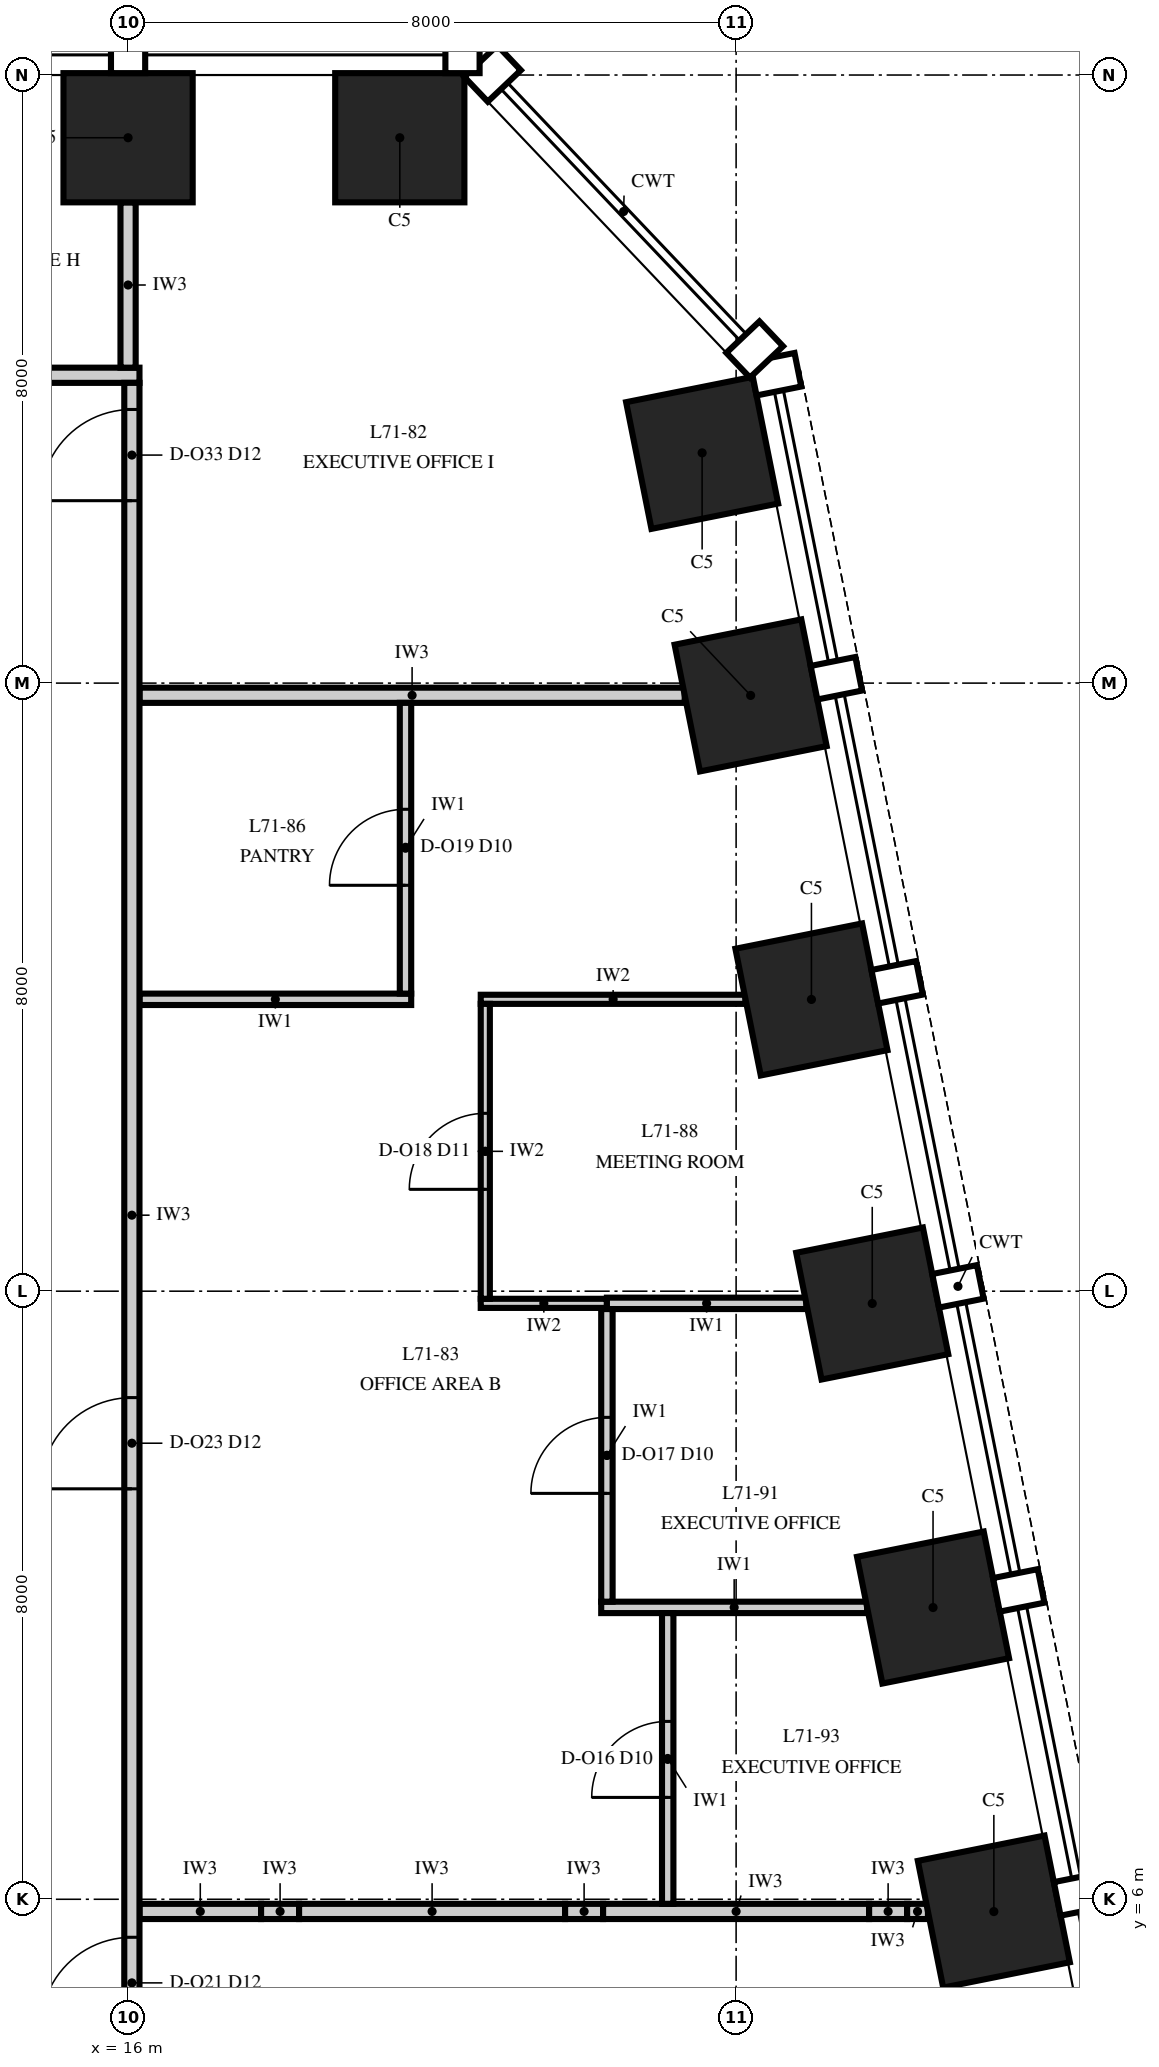
"""IFC4 building model, lengths in metres.
Left out: names, types, materials, properties, quantities, classifications, styles, units other than length and angle.
Written with IfcOpenShell. Run it as: python <this file> out.ifc"""

import sys

from ifc_helpers import new_model, si_unit, direction, frame, frame_2d, origin, origin_2d, place, context, subcontext, project, spatial, rectangle, extrude, element, fill, save


model = new_model("IFC4")
c1 = context("Model", 3, precision=1e-05, world=origin(), true_north=direction((0.0, 1.0)))
c2 = subcontext(c1, "Body", "Model", "MODEL_VIEW")
j1 = project(units=[si_unit("LENGTHUNIT", "METRE"), si_unit("PLANEANGLEUNIT", "RADIAN")], contexts=[c1])
p1 = place(None, origin())
s1 = spatial("IfcSite", under=j1, at=p1, CompositionType="ELEMENT")
p2 = place(p1, origin())
s2 = spatial("IfcBuilding", under=s1, at=p2, CompositionType="ELEMENT")
p3 = place(p2, frame((0.0, 0.0, 304.0)))
s3 = spatial("IfcBuildingStorey", under=s2, at=p3, CompositionType="ELEMENT", Elevation=304.0)
for number, where, z_axis, x_axis in (
    (1, (27.391, 5.838, 0.0), (0.0, 0.0, 1.0), (-0.196, 0.981, 0.0)),
    (2, (26.591, 9.838, 0.0), (0.0, 0.0, 1.0), (-0.196, 0.981, 0.0)),
    (3, (25.791, 13.838, 0.0), (0.0, 0.0, 1.0), (-0.196, 0.981, 0.0)),
    (4, (24.991, 17.838, 0.0), (0.0, 0.0, 1.0), (-0.196, 0.981, 0.0)),
    (5, (24.191, 21.838, 0.0), (0.0, 0.0, 1.0), (-0.196, 0.981, 0.0)),
    (6, (23.553, 25.029, 0.0), (0.0, 0.0, 1.0), (-0.196, 0.981, 0.0)),
    (7, (19.575, 29.175, 0.0), (0.0, 0.0, 1.0), (-1.0, 0.0, 0.0)),
    (8, (16.0, 29.175, 0.0), (0.0, 0.0, 1.0), (-1.0, 0.0, 0.0)),
):
    element("IfcColumn", number, at=place(p3, frame(where, z_axis=z_axis, x_axis=x_axis)), inside=s3, PredefinedType="COLUMN", context=c2, shape_type="SweptSolid", body=[
        extrude(rectangle(XDim=1.7, YDim=1.7, at=origin_2d()), origin(), (0.0, 0.0, 1.0), 4.0),
    ])
p4 = place(p3, frame((16.15, 5.84, 0.0), z_axis=(0.0, 0.0, 1.0), x_axis=(1.0, 0.0, 0.0)))
e9 = element("IfcWall", 9, at=p4, inside=s3, PredefinedType="PARTITIONING", context=c2, shape_type="SweptSolid", body=[
    extrude(rectangle(XDim=1.6, YDim=0.2, at=frame_2d((0.8, 0.0))), origin(), (0.0, 0.0, 1.0), 2.842),
])
p5 = place(p3, frame((17.75, 5.84, 0.0), z_axis=(0.0, 0.0, 1.0), x_axis=(1.0, 0.0, 0.0)))
e10 = element("IfcWall", 10, at=p5, inside=s3, PredefinedType="PARTITIONING", context=c2, shape_type="SweptSolid", body=[
    extrude(rectangle(XDim=0.5, YDim=0.2, at=frame_2d((0.25, 0.0))), origin(), (0.0, 0.0, 1.0), 2.15),
])
p6 = place(p3, frame((18.25, 5.84, 0.0), z_axis=(0.0, 0.0, 1.0), x_axis=(1.0, 0.0, 0.0)))
e11 = element("IfcWall", 11, at=p6, inside=s3, PredefinedType="PARTITIONING", context=c2, shape_type="SweptSolid", body=[
    extrude(rectangle(XDim=3.5, YDim=0.2, at=frame_2d((1.75, 0.0))), origin(), (0.0, 0.0, 1.0), 2.842),
])
p7 = place(p3, frame((21.75, 5.84, 0.0), z_axis=(0.0, 0.0, 1.0), x_axis=(1.0, 0.0, 0.0)))
e12 = element("IfcWall", 12, at=p7, inside=s3, PredefinedType="PARTITIONING", context=c2, shape_type="SweptSolid", body=[
    extrude(rectangle(XDim=0.5, YDim=0.2, at=frame_2d((0.25, 0.0))), origin(), (0.0, 0.0, 1.0), 2.15),
])
p8 = place(p3, frame((22.25, 5.84, 0.0), z_axis=(0.0, 0.0, 1.0), x_axis=(1.0, 0.0, 0.0)))
e13 = element("IfcWall", 13, at=p8, inside=s3, PredefinedType="PARTITIONING", context=c2, shape_type="SweptSolid", body=[
    extrude(rectangle(XDim=3.5, YDim=0.2, at=frame_2d((1.75, 0.0))), origin(), (0.0, 0.0, 1.0), 2.842),
])
p9 = place(p3, frame((25.75, 5.84, 0.0), z_axis=(0.0, 0.0, 1.0), x_axis=(1.0, 0.0, 0.0)))
e14 = element("IfcWall", 14, at=p9, inside=s3, PredefinedType="PARTITIONING", context=c2, shape_type="SweptSolid", body=[
    extrude(rectangle(XDim=0.5, YDim=0.2, at=frame_2d((0.25, 0.0))), origin(), (0.0, 0.0, 1.0), 2.15),
])
p10 = place(p3, frame((26.25, 5.84, 0.0), z_axis=(0.0, 0.0, 1.0), x_axis=(1.0, 0.0, 0.0)))
e15 = element("IfcWall", 15, at=p10, inside=s3, PredefinedType="PARTITIONING", context=c2, shape_type="SweptSolid", body=[
    extrude(rectangle(XDim=0.274, YDim=0.2, at=frame_2d((0.137, 0.0))), origin(), (0.0, 0.0, 1.0), 2.842),
])
p11 = place(p3, frame((22.225, 9.84, 0.0), z_axis=(0.0, 0.0, 1.0), x_axis=(1.0, 0.0, 0.0)))
e16 = element("IfcWall", 16, at=p11, inside=s3, PredefinedType="PARTITIONING", context=c2, shape_type="SweptSolid", body=[
    extrude(rectangle(XDim=3.499, YDim=0.15, at=frame_2d((1.75, 0.0))), origin(), (0.0, 0.0, 1.0), 3.23),
])
p12 = place(p3, frame((20.64, 13.84, 0.0), z_axis=(0.0, 0.0, 1.0), x_axis=(1.0, 0.0, 0.0)))
e17 = element("IfcWall", 17, at=p12, inside=s3, PredefinedType="PARTITIONING", context=c2, shape_type="SweptSolid", body=[
    extrude(rectangle(XDim=1.66, YDim=0.12, at=frame_2d((0.83, 0.0))), origin(), (0.0, 0.0, 1.0), 3.85),
])
p13 = place(p3, frame((22.3, 13.84, 0.0), z_axis=(0.0, 0.0, 1.0), x_axis=(1.0, 0.0, 0.0)))
e18 = element("IfcWall", 18, at=p13, inside=s3, PredefinedType="PARTITIONING", context=c2, shape_type="SweptSolid", body=[
    extrude(rectangle(XDim=2.624, YDim=0.15, at=frame_2d((1.312, 0.0))), origin(), (0.0, 0.0, 1.0), 3.23),
])
p14 = place(p3, frame((16.15, 17.84, 0.0), z_axis=(0.0, 0.0, 1.0), x_axis=(1.0, 0.0, 0.0)))
e19 = element("IfcWall", 19, at=p14, inside=s3, PredefinedType="PARTITIONING", context=c2, shape_type="SweptSolid", body=[
    extrude(rectangle(XDim=3.575, YDim=0.15, at=frame_2d((1.788, 0.0))), origin(), (0.0, 0.0, 1.0), 3.23),
])
p15 = place(p3, frame((20.64, 17.84, 0.0), z_axis=(0.0, 0.0, 1.0), x_axis=(1.0, 0.0, 0.0)))
e20 = element("IfcWall", 20, at=p15, inside=s3, PredefinedType="PARTITIONING", context=c2, shape_type="SweptSolid", body=[
    extrude(rectangle(XDim=3.484, YDim=0.12, at=frame_2d((1.742, 0.0))), origin(), (0.0, 0.0, 1.0), 3.23),
])
p16 = place(p3, frame((16.15, 21.84, 0.0), z_axis=(0.0, 0.0, 1.0), x_axis=(1.0, 0.0, 0.0)))
e21 = element("IfcWall", 21, at=p16, inside=s3, PredefinedType="PARTITIONING", context=c2, shape_type="SweptSolid", body=[
    extrude(rectangle(XDim=7.174, YDim=0.2, at=frame_2d((3.587, 0.0))), origin(), (0.0, 0.0, 1.0), 3.23),
])
p17 = place(p3, frame((-16.15, 26.05, 0.0), z_axis=(0.0, 0.0, 1.0), x_axis=(1.0, 0.0, 0.0)))
e22 = element("IfcWall", 22, at=p17, inside=s3, PredefinedType="PARTITIONING", context=c2, shape_type="SweptSolid", body=[
    extrude(rectangle(XDim=32.3, YDim=0.2, at=frame_2d((16.15, 0.0))), origin(), (0.0, 0.0, 1.0), 3.418),
])
p18 = place(p17, frame((1.55, 0.0, 0.0)))
e23 = element("IfcOpeningElement", 23, at=p18, cuts=e22, PredefinedType="OPENING", context=c2, shape_type="SweptSolid", body=[
    extrude(rectangle(XDim=1.2, YDim=2.4, at=frame_2d((0.6, 1.2))), frame((0.0, 0.115, 0.0), z_axis=(0.0, -1.0, 0.0), x_axis=(1.0, 0.0, 0.0)), (0.0, 0.0, 1.0), 0.23),
])
p19 = place(p17, frame((5.55, 0.0, 0.0)))
e24 = element("IfcOpeningElement", 24, at=p19, cuts=e22, PredefinedType="OPENING", context=c2, shape_type="SweptSolid", body=[
    extrude(rectangle(XDim=1.2, YDim=2.4, at=frame_2d((0.6, 1.2))), frame((0.0, 0.115, 0.0), z_axis=(0.0, -1.0, 0.0), x_axis=(1.0, 0.0, 0.0)), (0.0, 0.0, 1.0), 0.23),
])
p20 = place(p17, frame((9.55, 0.0, 0.0)))
e25 = element("IfcOpeningElement", 25, at=p20, cuts=e22, PredefinedType="OPENING", context=c2, shape_type="SweptSolid", body=[
    extrude(rectangle(XDim=1.2, YDim=2.4, at=frame_2d((0.6, 1.2))), frame((0.0, 0.115, 0.0), z_axis=(0.0, -1.0, 0.0), x_axis=(1.0, 0.0, 0.0)), (0.0, 0.0, 1.0), 0.23),
])
p21 = place(p17, frame((13.55, 0.0, 0.0)))
e26 = element("IfcOpeningElement", 26, at=p21, cuts=e22, PredefinedType="OPENING", context=c2, shape_type="SweptSolid", body=[
    extrude(rectangle(XDim=1.2, YDim=2.4, at=frame_2d((0.6, 1.2))), frame((0.0, 0.115, 0.0), z_axis=(0.0, -1.0, 0.0), x_axis=(1.0, 0.0, 0.0)), (0.0, 0.0, 1.0), 0.23),
])
p22 = place(p17, frame((17.55, 0.0, 0.0)))
e27 = element("IfcOpeningElement", 27, at=p22, cuts=e22, PredefinedType="OPENING", context=c2, shape_type="SweptSolid", body=[
    extrude(rectangle(XDim=1.2, YDim=2.4, at=frame_2d((0.6, 1.2))), frame((0.0, 0.115, 0.0), z_axis=(0.0, -1.0, 0.0), x_axis=(1.0, 0.0, 0.0)), (0.0, 0.0, 1.0), 0.23),
])
p23 = place(p17, frame((21.55, 0.0, 0.0)))
e28 = element("IfcOpeningElement", 28, at=p23, cuts=e22, PredefinedType="OPENING", context=c2, shape_type="SweptSolid", body=[
    extrude(rectangle(XDim=1.2, YDim=2.4, at=frame_2d((0.6, 1.2))), frame((0.0, 0.115, 0.0), z_axis=(0.0, -1.0, 0.0), x_axis=(1.0, 0.0, 0.0)), (0.0, 0.0, 1.0), 0.23),
])
p24 = place(p17, frame((25.55, 0.0, 0.0)))
e29 = element("IfcOpeningElement", 29, at=p24, cuts=e22, PredefinedType="OPENING", context=c2, shape_type="SweptSolid", body=[
    extrude(rectangle(XDim=1.2, YDim=2.4, at=frame_2d((0.6, 1.2))), frame((0.0, 0.115, 0.0), z_axis=(0.0, -1.0, 0.0), x_axis=(1.0, 0.0, 0.0)), (0.0, 0.0, 1.0), 0.23),
])
p25 = place(p17, frame((29.55, 0.0, 0.0)))
e30 = element("IfcOpeningElement", 30, at=p25, cuts=e22, PredefinedType="OPENING", context=c2, shape_type="SweptSolid", body=[
    extrude(rectangle(XDim=1.2, YDim=2.4, at=frame_2d((0.6, 1.2))), frame((0.0, 0.115, 0.0), z_axis=(0.0, -1.0, 0.0), x_axis=(1.0, 0.0, 0.0)), (0.0, 0.0, 1.0), 0.23),
])
p26 = place(p3, frame((16.0, 26.15, 0.0), z_axis=(0.0, 0.0, 1.0), x_axis=(0.0, 1.0, 0.0)))
e31 = element("IfcWall", 31, at=p26, inside=s3, PredefinedType="PARTITIONING", context=c2, shape_type="SweptSolid", body=[
    extrude(rectangle(XDim=2.175, YDim=0.2, at=frame_2d((1.087, 0.0))), origin(), (0.0, 0.0, 1.0), 3.418),
])
p27 = place(p3, frame((16.05, 4.05, 0.0), z_axis=(0.0, 0.0, 1.0), x_axis=(0.0, 1.0, 0.0)))
e32 = element("IfcWall", 32, at=p27, inside=s3, PredefinedType="PARTITIONING", context=c2, shape_type="SweptSolid", body=[
    extrude(rectangle(XDim=21.9, YDim=0.2, at=frame_2d((10.95, 0.0))), origin(), (0.0, 0.0, 1.0), 2.842),
])
p28 = place(p27, frame((0.25, 0.0, 0.0)))
e33 = element("IfcOpeningElement", 33, at=p28, cuts=e32, PredefinedType="OPENING", context=c2, shape_type="SweptSolid", body=[
    extrude(rectangle(XDim=1.2, YDim=2.4, at=frame_2d((0.6, 1.2))), frame((0.0, 0.115, 0.0), z_axis=(0.0, -1.0, 0.0), x_axis=(1.0, 0.0, 0.0)), (0.0, 0.0, 1.0), 0.23),
])
p29 = place(p27, frame((7.35, 0.0, 0.0)))
e34 = element("IfcOpeningElement", 34, at=p29, cuts=e32, PredefinedType="OPENING", context=c2, shape_type="SweptSolid", body=[
    extrude(rectangle(XDim=1.2, YDim=2.4, at=frame_2d((0.6, 1.2))), frame((0.0, 0.115, 0.0), z_axis=(0.0, -1.0, 0.0), x_axis=(1.0, 0.0, 0.0)), (0.0, 0.0, 1.0), 0.23),
])
p30 = place(p27, frame((20.35, 0.0, 0.0)))
e35 = element("IfcOpeningElement", 35, at=p30, cuts=e32, PredefinedType="OPENING", context=c2, shape_type="SweptSolid", body=[
    extrude(rectangle(XDim=1.2, YDim=2.4, at=frame_2d((0.6, 1.2))), frame((0.0, 0.115, 0.0), z_axis=(0.0, -1.0, 0.0), x_axis=(1.0, 0.0, 0.0)), (0.0, 0.0, 1.0), 0.23),
])
p31 = place(p3, frame((19.65, 17.915, 0.0), z_axis=(0.0, 0.0, 1.0), x_axis=(0.0, 1.0, 0.0)))
e36 = element("IfcWall", 36, at=p31, inside=s3, PredefinedType="PARTITIONING", context=c2, shape_type="SweptSolid", body=[
    extrude(rectangle(XDim=3.825, YDim=0.15, at=frame_2d((1.913, 0.0))), origin(), (0.0, 0.0, 1.0), 3.23),
])
p32 = place(p31, frame((1.425, 0.0, 0.0)))
e37 = element("IfcOpeningElement", 37, at=p32, cuts=e36, PredefinedType="OPENING", context=c2, shape_type="SweptSolid", body=[
    extrude(rectangle(XDim=1.0, YDim=2.3, at=frame_2d((0.5, 1.15))), frame((0.0, 0.09, 0.0), z_axis=(0.0, -1.0, 0.0), x_axis=(1.0, 0.0, 0.0)), (0.0, 0.0, 1.0), 0.18),
])
p33 = place(p3, frame((20.7, 13.9, 0.0), z_axis=(0.0, 0.0, 1.0), x_axis=(0.0, 1.0, 0.0)))
e38 = element("IfcWall", 38, at=p33, inside=s3, PredefinedType="PARTITIONING", context=c2, shape_type="SweptSolid", body=[
    extrude(rectangle(XDim=3.88, YDim=0.12, at=frame_2d((1.94, 0.0))), origin(), (0.0, 0.0, 1.0), 3.23),
])
p34 = place(p33, frame((1.44, 0.0, 0.0)))
e39 = element("IfcOpeningElement", 39, at=p34, cuts=e38, PredefinedType="OPENING", context=c2, shape_type="SweptSolid", body=[
    extrude(rectangle(XDim=1.0, YDim=2.4, at=frame_2d((0.5, 1.2))), frame((0.0, 0.075, 0.0), z_axis=(0.0, -1.0, 0.0), x_axis=(1.0, 0.0, 0.0)), (0.0, 0.0, 1.0), 0.15),
])
p35 = place(p3, frame((22.3, 9.915, 0.0), z_axis=(0.0, 0.0, 1.0), x_axis=(0.0, 1.0, 0.0)))
e40 = element("IfcWall", 40, at=p35, inside=s3, PredefinedType="PARTITIONING", context=c2, shape_type="SweptSolid", body=[
    extrude(rectangle(XDim=3.85, YDim=0.15, at=frame_2d((1.925, 0.0))), origin(), (0.0, 0.0, 1.0), 3.85),
])
p36 = place(p35, frame((1.425, 0.0, 0.0)))
e41 = element("IfcOpeningElement", 41, at=p36, cuts=e40, PredefinedType="OPENING", context=c2, shape_type="SweptSolid", body=[
    extrude(rectangle(XDim=1.0, YDim=2.3, at=frame_2d((0.5, 1.15))), frame((0.0, 0.09, 0.0), z_axis=(0.0, -1.0, 0.0), x_axis=(1.0, 0.0, 0.0)), (0.0, 0.0, 1.0), 0.18),
])
p37 = place(p3, frame((23.1, 5.94, 0.0), z_axis=(0.0, 0.0, 1.0), x_axis=(0.0, 1.0, 0.0)))
e42 = element("IfcWall", 42, at=p37, inside=s3, PredefinedType="PARTITIONING", context=c2, shape_type="SweptSolid", body=[
    extrude(rectangle(XDim=3.825, YDim=0.15, at=frame_2d((1.913, 0.0))), origin(), (0.0, 0.0, 1.0), 2.842),
])
p38 = place(p37, frame((1.4, 0.0, 0.0)))
e43 = element("IfcOpeningElement", 43, at=p38, cuts=e42, PredefinedType="OPENING", context=c2, shape_type="SweptSolid", body=[
    extrude(rectangle(XDim=1.0, YDim=2.3, at=frame_2d((0.5, 1.15))), frame((0.0, 0.09, 0.0), z_axis=(0.0, -1.0, 0.0), x_axis=(1.0, 0.0, 0.0)), (0.0, 0.0, 1.0), 0.18),
])
p39 = place(p38, origin())
e44 = element("IfcDoor", 44, at=p39, inside=s3, OperationType="SINGLE_SWING_LEFT", PredefinedType="DOOR", context=c2, shape_type="SweptSolid", body=[
    extrude(rectangle(XDim=1.0, YDim=2.3, at=frame_2d((0.5, 1.15))), frame((0.0, 0.075, 0.0), z_axis=(0.0, -1.0, 0.0), x_axis=(1.0, 0.0, 0.0)), (0.0, 0.0, 1.0), 0.149),
])
fill(e43, e44)
p40 = place(p36, origin())
e45 = element("IfcDoor", 45, at=p40, inside=s3, OperationType="SINGLE_SWING_LEFT", PredefinedType="DOOR", context=c2, shape_type="SweptSolid", body=[
    extrude(rectangle(XDim=1.0, YDim=2.3, at=frame_2d((0.5, 1.15))), frame((0.0, 0.075, 0.0), z_axis=(0.0, -1.0, 0.0), x_axis=(1.0, 0.0, 0.0)), (0.0, 0.0, 1.0), 0.149),
])
fill(e41, e45)
p41 = place(p34, origin())
e46 = element("IfcDoor", 46, at=p41, inside=s3, OperationType="SINGLE_SWING_RIGHT", PredefinedType="DOOR", context=c2, shape_type="SweptSolid", body=[
    extrude(rectangle(XDim=1.0, YDim=2.4, at=frame_2d((0.5, 1.2))), frame((0.0, 0.06, 0.0), z_axis=(0.0, -1.0, 0.0), x_axis=(1.0, 0.0, 0.0)), (0.0, 0.0, 1.0), 0.12),
])
fill(e39, e46)
p42 = place(p32, origin())
e47 = element("IfcDoor", 47, at=p42, inside=s3, OperationType="SINGLE_SWING_LEFT", PredefinedType="DOOR", context=c2, shape_type="SweptSolid", body=[
    extrude(rectangle(XDim=1.0, YDim=2.3, at=frame_2d((0.5, 1.15))), frame((0.0, 0.075, 0.0), z_axis=(0.0, -1.0, 0.0), x_axis=(1.0, 0.0, 0.0)), (0.0, 0.0, 1.0), 0.149),
])
fill(e37, e47)
p43 = place(p28, origin())
e48 = element("IfcDoor", 48, at=p43, inside=s3, OperationType="SINGLE_SWING_LEFT", PredefinedType="DOOR", context=c2, shape_type="SweptSolid", body=[
    extrude(rectangle(XDim=1.2, YDim=2.4, at=frame_2d((0.6, 1.2))), frame((0.0, 0.1, 0.0), z_axis=(0.0, -1.0, 0.0), x_axis=(1.0, 0.0, 0.0)), (0.0, 0.0, 1.0), 0.199),
])
fill(e33, e48)
p44 = place(p29, origin())
e49 = element("IfcDoor", 49, at=p44, inside=s3, OperationType="SINGLE_SWING_LEFT", PredefinedType="DOOR", context=c2, shape_type="SweptSolid", body=[
    extrude(rectangle(XDim=1.2, YDim=2.4, at=frame_2d((0.6, 1.2))), frame((0.0, 0.1, 0.0), z_axis=(0.0, -1.0, 0.0), x_axis=(1.0, 0.0, 0.0)), (0.0, 0.0, 1.0), 0.199),
])
fill(e34, e49)
p45 = place(p30, origin())
e50 = element("IfcDoor", 50, at=p45, inside=s3, OperationType="SINGLE_SWING_LEFT", PredefinedType="DOOR", context=c2, shape_type="SweptSolid", body=[
    extrude(rectangle(XDim=1.2, YDim=2.4, at=frame_2d((0.6, 1.2))), frame((0.0, 0.1, 0.0), z_axis=(0.0, -1.0, 0.0), x_axis=(1.0, 0.0, 0.0)), (0.0, 0.0, 1.0), 0.199),
])
fill(e35, e50)
save(model, sys.argv[1])
